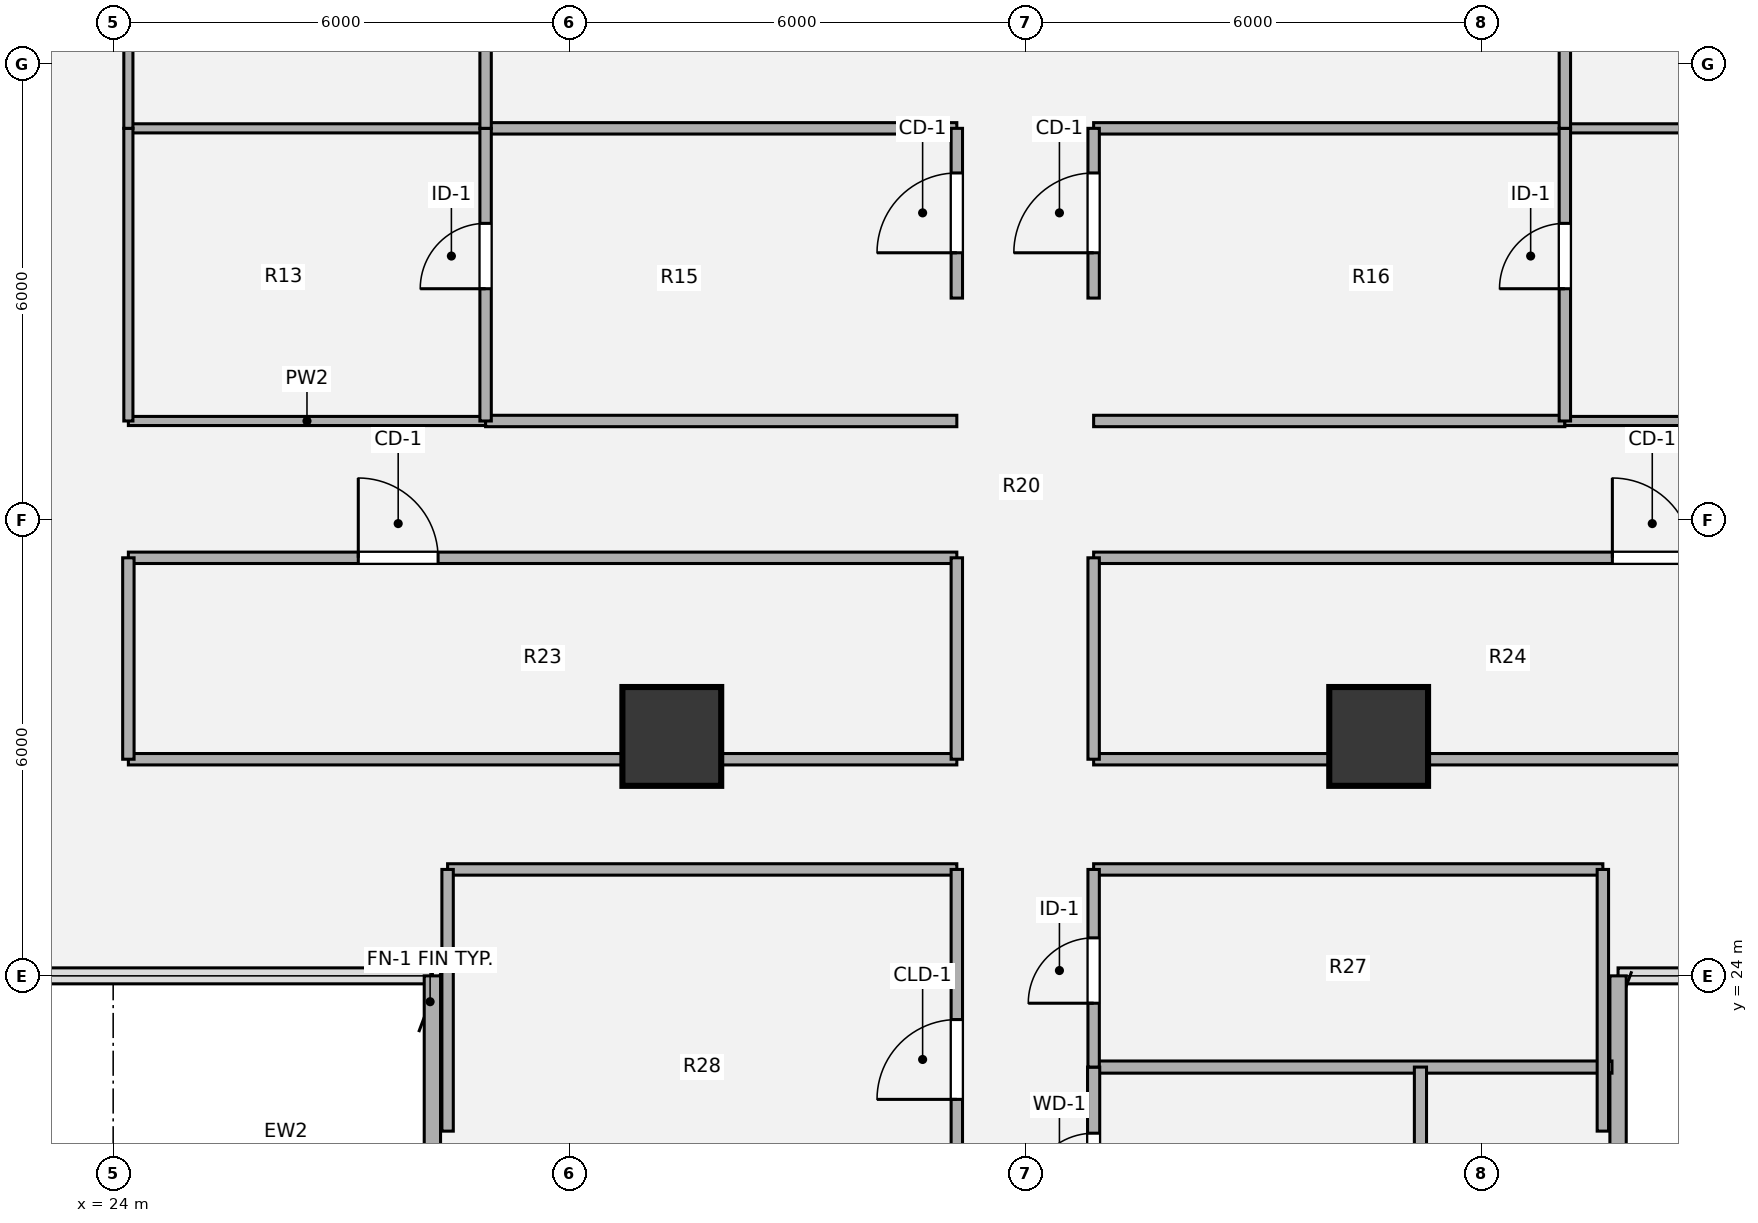
"""IFC4 building model, lengths in metres.
Left out: names, types, materials, properties, quantities, classifications, styles, units other than length and angle.
Written with IfcOpenShell. Run it as: python <this file> out.ifc"""

import sys

from ifc_helpers import new_model, si_unit, direction, frame, frame_2d, origin, origin_2d, place, context, subcontext, project, spatial, rectangle, hollow_circle, extrude, source, transform, mapped, element, fill, save


model = new_model("IFC4")
c1 = context("Model", 3, precision=1e-05, world=origin(), true_north=direction((0.0, 1.0)))
c2 = subcontext(c1, "Body", "Model", "MODEL_VIEW")
j1 = project(units=[si_unit("LENGTHUNIT", "METRE"), si_unit("PLANEANGLEUNIT", "RADIAN")], contexts=[c1])
p1 = place(None, origin())
s1 = spatial("IfcSite", under=j1, at=p1, CompositionType="ELEMENT")
p2 = place(p1, origin())
s2 = spatial("IfcBuilding", under=s1, at=p2, CompositionType="ELEMENT")
p3 = place(p2, frame((0.0, 0.0, 131.4)))
s3 = spatial("IfcBuildingStorey", under=s2, at=p3, CompositionType="ELEMENT", Elevation=131.4)
m1 = source(origin(), c2, "Body", "SweptSolid", [
    extrude(hollow_circle(Radius=0.65, WallThickness=0.045, at=origin_2d()), origin(), (0.0, 0.0, 1.0), 3.78),
])
for number, where, z_axis, x_axis in (
    (1, (31.35, 27.15, 0.0), (0.0, 0.0, 1.0), (1.0, 0.0, 0.0)),
    (2, (40.65, 27.15, 0.0), (0.0, 0.0, 1.0), (1.0, 0.0, 0.0)),
):
    element("IfcColumn", number, at=place(p3, frame(where, z_axis=z_axis, x_axis=x_axis)), inside=s3, PredefinedType="COLUMN", context=c2, shape_type="MappedRepresentation", body=[
        mapped(m1, transform((0.0, 0.0, 0.0), x_axis=(1.0, 0.0, 0.0), y_axis=(0.0, 1.0, 0.0), z_axis=(0.0, 0.0, 1.0), scale=1.0)),
    ])
for number, where, z_axis, x_axis in (
    (3, (28.2, 21.4, 0.0), (0.0, 0.0, 1.0), (0.0, 1.0, 0.0)),
    (4, (43.8, 24.0, 0.0), (0.0, 0.0, 1.0), (0.0, -1.0, 0.0)),
):
    element("IfcWall", number, at=place(p3, frame(where, z_axis=z_axis, x_axis=x_axis)), inside=s3, PredefinedType="SOLIDWALL", context=c2, shape_type="SweptSolid", body=[
        extrude(rectangle(XDim=2.6, YDim=0.215, at=frame_2d((1.3, 0.0))), origin(), (0.0, 0.0, 1.0), 3.53),
    ])
p4 = place(p3, frame((36.9, 22.8, 0.0), z_axis=(0.0, 0.0, 1.0), x_axis=(1.0, 0.0, 0.0)))
e5 = element("IfcWall", 5, at=p4, inside=s3, PredefinedType="PLUMBINGWALL", context=c2, shape_type="SweptSolid", body=[
    extrude(rectangle(XDim=6.82, YDim=0.16, at=frame_2d((3.41, 0.0))), origin(), (0.0, 0.0, 1.0), 3.5),
])
for number, where, z_axis, x_axis in (
    (6, (28.4, 25.4, 0.0), (0.0, 0.0, 1.0), (1.0, 0.0, 0.0)),
    (7, (36.9, 25.4, 0.0), (0.0, 0.0, 1.0), (1.0, 0.0, 0.0)),
):
    element("IfcWall", number, at=place(p3, frame(where, z_axis=z_axis, x_axis=x_axis)), inside=s3, PredefinedType="PARTITIONING", context=c2, shape_type="SweptSolid", body=[
        extrude(rectangle(XDim=6.7, YDim=0.15, at=frame_2d((3.35, 0.0))), origin(), (0.0, 0.0, 1.0), 3.5),
    ])
for number, where, z_axis, x_axis in (
    (8, (24.2, 26.85, 0.0), (0.0, 0.0, 1.0), (1.0, 0.0, 0.0)),
    (9, (36.9, 26.85, 0.0), (0.0, 0.0, 1.0), (1.0, 0.0, 0.0)),
):
    element("IfcWall", number, at=place(p3, frame(where, z_axis=z_axis, x_axis=x_axis)), inside=s3, PredefinedType="PARTITIONING", context=c2, shape_type="SweptSolid", body=[
        extrude(rectangle(XDim=10.9, YDim=0.15, at=frame_2d((5.45, 0.0))), origin(), (0.0, 0.0, 1.0), 2.903),
    ])
p5 = place(p3, frame((24.2, 29.5, 0.0), z_axis=(0.0, 0.0, 1.0), x_axis=(1.0, 0.0, 0.0)))
e10 = element("IfcWall", 10, at=p5, inside=s3, PredefinedType="PARTITIONING", context=c2, shape_type="SweptSolid", body=[
    extrude(rectangle(XDim=10.9, YDim=0.15, at=frame_2d((5.45, 0.0))), origin(), (0.0, 0.0, 1.0), 2.982),
])
p6 = place(p5, frame((3.025, 0.0, 0.0)))
e11 = element("IfcOpeningElement", 11, at=p6, cuts=e10, PredefinedType="OPENING", context=c2, shape_type="SweptSolid", body=[
    extrude(rectangle(XDim=1.05, YDim=2.1, at=origin_2d()), frame((0.525, 0.085, 1.05), z_axis=(0.0, -1.0, 0.0), x_axis=(1.0, 0.0, 0.0)), (0.0, 0.0, 1.0), 0.17),
])
p7 = place(p3, frame((36.9, 29.5, 0.0), z_axis=(0.0, 0.0, 1.0), x_axis=(1.0, 0.0, 0.0)))
e12 = element("IfcWall", 12, at=p7, inside=s3, PredefinedType="PARTITIONING", context=c2, shape_type="SweptSolid", body=[
    extrude(rectangle(XDim=10.9, YDim=0.15, at=frame_2d((5.45, 0.0))), origin(), (0.0, 0.0, 1.0), 2.982),
])
p8 = place(p7, frame((6.825, 0.0, 0.0)))
e13 = element("IfcOpeningElement", 13, at=p8, cuts=e12, PredefinedType="OPENING", context=c2, shape_type="SweptSolid", body=[
    extrude(rectangle(XDim=1.05, YDim=2.1, at=origin_2d()), frame((0.525, 0.085, 1.05), z_axis=(0.0, -1.0, 0.0), x_axis=(1.0, 0.0, 0.0)), (0.0, 0.0, 1.0), 0.17),
])
p9 = place(p3, frame((24.2, 31.3, 0.0), z_axis=(0.0, 0.0, 1.0), x_axis=(1.0, 0.0, 0.0)))
e14 = element("IfcWall", 14, at=p9, inside=s3, PredefinedType="PARTITIONING", context=c2, shape_type="SweptSolid", body=[
    extrude(rectangle(XDim=4.7, YDim=0.12, at=frame_2d((2.35, 0.0))), origin(), (0.0, 0.0, 1.0), 2.982),
])
for number, where, z_axis, x_axis in (
    (15, (28.9, 31.3, 0.0), (0.0, 0.0, 1.0), (1.0, 0.0, 0.0)),
    (16, (36.9, 31.3, 0.0), (0.0, 0.0, 1.0), (1.0, 0.0, 0.0)),
):
    element("IfcWall", number, at=place(p3, frame(where, z_axis=z_axis, x_axis=x_axis)), inside=s3, PredefinedType="PARTITIONING", context=c2, shape_type="SweptSolid", body=[
        extrude(rectangle(XDim=6.2, YDim=0.15, at=frame_2d((3.1, 0.0))), origin(), (0.0, 0.0, 1.0), 2.982),
    ])
for number, where, z_axis, x_axis in (
    (17, (43.1, 31.3, 0.0), (0.0, 0.0, 1.0), (1.0, 0.0, 0.0)),
    (18, (24.2, 35.15, 0.0), (0.0, 0.0, 1.0), (1.0, 0.0, 0.0)),
):
    element("IfcWall", number, at=place(p3, frame(where, z_axis=z_axis, x_axis=x_axis)), inside=s3, PredefinedType="PARTITIONING", context=c2, shape_type="SweptSolid", body=[
        extrude(rectangle(XDim=4.7, YDim=0.12, at=frame_2d((2.35, 0.0))), origin(), (0.0, 0.0, 1.0), 2.982),
    ])
for number, where, z_axis, x_axis in (
    (19, (28.9, 35.15, 0.0), (0.0, 0.0, 1.0), (1.0, 0.0, 0.0)),
    (20, (36.9, 35.15, 0.0), (0.0, 0.0, 1.0), (1.0, 0.0, 0.0)),
):
    element("IfcWall", number, at=place(p3, frame(where, z_axis=z_axis, x_axis=x_axis)), inside=s3, PredefinedType="PARTITIONING", context=c2, shape_type="SweptSolid", body=[
        extrude(rectangle(XDim=6.2, YDim=0.15, at=frame_2d((3.1, 0.0))), origin(), (0.0, 0.0, 1.0), 2.982),
    ])
p10 = place(p3, frame((43.1, 35.15, 0.0), z_axis=(0.0, 0.0, 1.0), x_axis=(1.0, 0.0, 0.0)))
e21 = element("IfcWall", 21, at=p10, inside=s3, PredefinedType="PARTITIONING", context=c2, shape_type="SweptSolid", body=[
    extrude(rectangle(XDim=4.7, YDim=0.12, at=frame_2d((2.35, 0.0))), origin(), (0.0, 0.0, 1.0), 2.982),
])
p11 = place(p3, frame((24.2, 26.85, 0.0), z_axis=(0.0, 0.0, 1.0), x_axis=(0.0, 1.0, 0.0)))
e22 = element("IfcWall", 22, at=p11, inside=s3, PredefinedType="PARTITIONING", context=c2, shape_type="SweptSolid", body=[
    extrude(rectangle(XDim=2.65, YDim=0.15, at=frame_2d((1.325, 0.0))), origin(), (0.0, 0.0, 1.0), 3.5),
])
p12 = place(p3, frame((24.2, 31.3, 0.0), z_axis=(0.0, 0.0, 1.0), x_axis=(0.0, 1.0, 0.0)))
e23 = element("IfcWall", 23, at=p12, inside=s3, PredefinedType="PARTITIONING", context=c2, shape_type="SweptSolid", body=[
    extrude(rectangle(XDim=3.85, YDim=0.12, at=frame_2d((1.925, 0.0))), origin(), (0.0, 0.0, 1.0), 3.5),
])
p13 = place(p3, frame((24.2, 35.15, 0.0), z_axis=(0.0, 0.0, 1.0), x_axis=(0.0, 1.0, 0.0)))
e24 = element("IfcWall", 24, at=p13, inside=s3, PredefinedType="PARTITIONING", context=c2, shape_type="SweptSolid", body=[
    extrude(rectangle(XDim=3.85, YDim=0.12, at=frame_2d((1.925, 0.0))), origin(), (0.0, 0.0, 1.0), 3.5),
])
p14 = place(p3, frame((28.4, 21.957, 0.0), z_axis=(0.0, 0.0, 1.0), x_axis=(0.0, 1.0, 0.0)))
e25 = element("IfcWall", 25, at=p14, inside=s3, PredefinedType="PARTITIONING", context=c2, shape_type="SweptSolid", body=[
    extrude(rectangle(XDim=3.443, YDim=0.15, at=frame_2d((1.721, 0.0))), origin(), (0.0, 0.0, 1.0), 3.5),
])
p15 = place(p3, frame((28.9, 31.3, 0.0), z_axis=(0.0, 0.0, 1.0), x_axis=(0.0, 1.0, 0.0)))
e26 = element("IfcWall", 26, at=p15, inside=s3, PredefinedType="PARTITIONING", context=c2, shape_type="SweptSolid", body=[
    extrude(rectangle(XDim=3.85, YDim=0.15, at=frame_2d((1.925, 0.0))), origin(), (0.0, 0.0, 1.0), 3.5),
])
p16 = place(p15, frame((1.74, 0.0, 0.0)))
e27 = element("IfcOpeningElement", 27, at=p16, cuts=e26, PredefinedType="OPENING", context=c2, shape_type="SweptSolid", body=[
    extrude(rectangle(XDim=0.86, YDim=2.1, at=origin_2d()), frame((0.43, 0.085, 1.05), z_axis=(0.0, -1.0, 0.0), x_axis=(1.0, 0.0, 0.0)), (0.0, 0.0, 1.0), 0.17),
])
p17 = place(p3, frame((28.9, 35.15, 0.0), z_axis=(0.0, 0.0, 1.0), x_axis=(0.0, 1.0, 0.0)))
e28 = element("IfcWall", 28, at=p17, inside=s3, PredefinedType="PARTITIONING", context=c2, shape_type="SweptSolid", body=[
    extrude(rectangle(XDim=3.85, YDim=0.15, at=frame_2d((1.925, 0.0))), origin(), (0.0, 0.0, 1.0), 3.5),
])
p18 = place(p17, frame((1.89, 0.0, 0.0)))
e29 = element("IfcOpeningElement", 29, at=p18, cuts=e28, PredefinedType="OPENING", context=c2, shape_type="SweptSolid", body=[
    extrude(rectangle(XDim=0.86, YDim=2.1, at=origin_2d()), frame((0.43, 0.085, 1.05), z_axis=(0.0, -1.0, 0.0), x_axis=(1.0, 0.0, 0.0)), (0.0, 0.0, 1.0), 0.17),
])
p19 = place(p3, frame((35.1, 20.2, 0.0), z_axis=(0.0, 0.0, 1.0), x_axis=(0.0, 1.0, 0.0)))
e30 = element("IfcWall", 30, at=p19, inside=s3, PredefinedType="PARTITIONING", context=c2, shape_type="SweptSolid", body=[
    extrude(rectangle(XDim=5.2, YDim=0.15, at=frame_2d((2.6, 0.0))), origin(), (0.0, 0.0, 1.0), 3.5),
])
p20 = place(p19, frame((2.175, 0.0, 0.0)))
e31 = element("IfcOpeningElement", 31, at=p20, cuts=e30, PredefinedType="OPENING", context=c2, shape_type="SweptSolid", body=[
    extrude(rectangle(XDim=1.05, YDim=2.1, at=origin_2d()), frame((0.525, 0.085, 1.05), z_axis=(0.0, -1.0, 0.0), x_axis=(1.0, 0.0, 0.0)), (0.0, 0.0, 1.0), 0.17),
])
p21 = place(p3, frame((35.1, 26.85, 0.0), z_axis=(0.0, 0.0, 1.0), x_axis=(0.0, 1.0, 0.0)))
e32 = element("IfcWall", 32, at=p21, inside=s3, PredefinedType="PARTITIONING", context=c2, shape_type="SweptSolid", body=[
    extrude(rectangle(XDim=2.65, YDim=0.15, at=frame_2d((1.325, 0.0))), origin(), (0.0, 0.0, 1.0), 3.5),
])
p22 = place(p3, frame((35.1, 32.917, 0.0), z_axis=(0.0, 0.0, 1.0), x_axis=(0.0, 1.0, 0.0)))
e33 = element("IfcWall", 33, at=p22, inside=s3, PredefinedType="PARTITIONING", context=c2, shape_type="SweptSolid", body=[
    extrude(rectangle(XDim=2.233, YDim=0.15, at=frame_2d((1.116, 0.0))), origin(), (0.0, 0.0, 1.0), 3.5),
])
p23 = place(p22, frame((0.596, 0.0, 0.0)))
e34 = element("IfcOpeningElement", 34, at=p23, cuts=e33, PredefinedType="OPENING", context=c2, shape_type="SweptSolid", body=[
    extrude(rectangle(XDim=1.05, YDim=2.1, at=origin_2d()), frame((0.525, 0.085, 1.05), z_axis=(0.0, -1.0, 0.0), x_axis=(1.0, 0.0, 0.0)), (0.0, 0.0, 1.0), 0.17),
])
p24 = place(p3, frame((36.9, 20.2, 0.0), z_axis=(0.0, 0.0, 1.0), x_axis=(0.0, 1.0, 0.0)))
e35 = element("IfcWall", 35, at=p24, inside=s3, PredefinedType="PLUMBINGWALL", context=c2, shape_type="SweptSolid", body=[
    extrude(rectangle(XDim=2.6, YDim=0.16, at=frame_2d((1.3, 0.0))), origin(), (0.0, 0.0, 1.0), 3.5),
])
p25 = place(p24, frame((0.87, 0.0, 0.0)))
e36 = element("IfcOpeningElement", 36, at=p25, cuts=e35, PredefinedType="OPENING", context=c2, shape_type="SweptSolid", body=[
    extrude(rectangle(XDim=0.86, YDim=2.1, at=origin_2d()), frame((0.43, 0.09, 1.05), z_axis=(0.0, -1.0, 0.0), x_axis=(1.0, 0.0, 0.0)), (0.0, 0.0, 1.0), 0.18),
])
p26 = place(p3, frame((36.9, 22.8, 0.0), z_axis=(0.0, 0.0, 1.0), x_axis=(0.0, 1.0, 0.0)))
e37 = element("IfcWall", 37, at=p26, inside=s3, PredefinedType="PARTITIONING", context=c2, shape_type="SweptSolid", body=[
    extrude(rectangle(XDim=2.6, YDim=0.15, at=frame_2d((1.3, 0.0))), origin(), (0.0, 0.0, 1.0), 3.5),
])
p27 = place(p26, frame((0.84, 0.0, 0.0)))
e38 = element("IfcOpeningElement", 38, at=p27, cuts=e37, PredefinedType="OPENING", context=c2, shape_type="SweptSolid", body=[
    extrude(rectangle(XDim=0.86, YDim=2.1, at=origin_2d()), frame((0.43, 0.085, 1.05), z_axis=(0.0, -1.0, 0.0), x_axis=(1.0, 0.0, 0.0)), (0.0, 0.0, 1.0), 0.17),
])
p28 = place(p3, frame((36.9, 26.85, 0.0), z_axis=(0.0, 0.0, 1.0), x_axis=(0.0, 1.0, 0.0)))
e39 = element("IfcWall", 39, at=p28, inside=s3, PredefinedType="PARTITIONING", context=c2, shape_type="SweptSolid", body=[
    extrude(rectangle(XDim=2.65, YDim=0.15, at=frame_2d((1.325, 0.0))), origin(), (0.0, 0.0, 1.0), 3.5),
])
p29 = place(p3, frame((36.9, 32.917, 0.0), z_axis=(0.0, 0.0, 1.0), x_axis=(0.0, 1.0, 0.0)))
e40 = element("IfcWall", 40, at=p29, inside=s3, PredefinedType="PARTITIONING", context=c2, shape_type="SweptSolid", body=[
    extrude(rectangle(XDim=2.233, YDim=0.15, at=frame_2d((1.116, 0.0))), origin(), (0.0, 0.0, 1.0), 3.5),
])
p30 = place(p29, frame((0.596, 0.0, 0.0)))
e41 = element("IfcOpeningElement", 41, at=p30, cuts=e40, PredefinedType="OPENING", context=c2, shape_type="SweptSolid", body=[
    extrude(rectangle(XDim=1.05, YDim=2.1, at=origin_2d()), frame((0.525, 0.085, 1.05), z_axis=(0.0, -1.0, 0.0), x_axis=(1.0, 0.0, 0.0)), (0.0, 0.0, 1.0), 0.17),
])
p31 = place(p3, frame((41.2, 20.2, 0.0), z_axis=(0.0, 0.0, 1.0), x_axis=(0.0, 1.0, 0.0)))
e42 = element("IfcWall", 42, at=p31, inside=s3, PredefinedType="PLUMBINGWALL", context=c2, shape_type="SweptSolid", body=[
    extrude(rectangle(XDim=2.6, YDim=0.16, at=frame_2d((1.3, 0.0))), origin(), (0.0, 0.0, 1.0), 2.815),
])
p32 = place(p3, frame((43.1, 31.3, 0.0), z_axis=(0.0, 0.0, 1.0), x_axis=(0.0, 1.0, 0.0)))
e43 = element("IfcWall", 43, at=p32, inside=s3, PredefinedType="PARTITIONING", context=c2, shape_type="SweptSolid", body=[
    extrude(rectangle(XDim=3.85, YDim=0.15, at=frame_2d((1.925, 0.0))), origin(), (0.0, 0.0, 1.0), 3.5),
])
p33 = place(p32, frame((1.74, 0.0, 0.0)))
e44 = element("IfcOpeningElement", 44, at=p33, cuts=e43, PredefinedType="OPENING", context=c2, shape_type="SweptSolid", body=[
    extrude(rectangle(XDim=0.86, YDim=2.1, at=origin_2d()), frame((0.43, 0.085, 1.05), z_axis=(0.0, -1.0, 0.0), x_axis=(1.0, 0.0, 0.0)), (0.0, 0.0, 1.0), 0.17),
])
p34 = place(p3, frame((43.1, 35.15, 0.0), z_axis=(0.0, 0.0, 1.0), x_axis=(0.0, 1.0, 0.0)))
e45 = element("IfcWall", 45, at=p34, inside=s3, PredefinedType="PARTITIONING", context=c2, shape_type="SweptSolid", body=[
    extrude(rectangle(XDim=3.85, YDim=0.15, at=frame_2d((1.925, 0.0))), origin(), (0.0, 0.0, 1.0), 3.5),
])
p35 = place(p34, frame((1.89, 0.0, 0.0)))
e46 = element("IfcOpeningElement", 46, at=p35, cuts=e45, PredefinedType="OPENING", context=c2, shape_type="SweptSolid", body=[
    extrude(rectangle(XDim=0.86, YDim=2.1, at=origin_2d()), frame((0.43, 0.085, 1.05), z_axis=(0.0, -1.0, 0.0), x_axis=(1.0, 0.0, 0.0)), (0.0, 0.0, 1.0), 0.17),
])
p36 = place(p3, frame((43.6, 21.958, 0.0), z_axis=(0.0, 0.0, 1.0), x_axis=(0.0, 1.0, 0.0)))
e47 = element("IfcWall", 47, at=p36, inside=s3, PredefinedType="PARTITIONING", context=c2, shape_type="SweptSolid", body=[
    extrude(rectangle(XDim=3.442, YDim=0.15, at=frame_2d((1.721, 0.0))), origin(), (0.0, 0.0, 1.0), 3.5),
])
m2 = source(origin(), c2, "Body", "SweptSolid", [
    extrude(rectangle(XDim=1.05, YDim=2.1, at=origin_2d()), frame((0.525, 0.025, 1.05), z_axis=(0.0, -1.0, 0.0), x_axis=(1.0, 0.0, 0.0)), (0.0, 0.0, 1.0), 0.05),
])
p37 = place(p6, origin())
e48 = element("IfcDoor", 48, at=p37, inside=s3, OperationType="SINGLE_SWING_LEFT", PredefinedType="DOOR", context=c2, shape_type="MappedRepresentation", body=[
    mapped(m2, transform((0.0, 0.0, 0.0), x_axis=(1.0, 0.0, 0.0), y_axis=(0.0, 1.0, 0.0), z_axis=(0.0, 0.0, 1.0), scale=1.0)),
])
fill(e11, e48)
p38 = place(p8, origin())
e49 = element("IfcDoor", 49, at=p38, inside=s3, OperationType="SINGLE_SWING_LEFT", PredefinedType="DOOR", context=c2, shape_type="MappedRepresentation", body=[
    mapped(m2, transform((0.0, 0.0, 0.0), x_axis=(1.0, 0.0, 0.0), y_axis=(0.0, 1.0, 0.0), z_axis=(0.0, 0.0, 1.0), scale=1.0)),
])
fill(e13, e49)
m3 = source(origin(), c2, "Body", "SweptSolid", [
    extrude(rectangle(XDim=0.86, YDim=2.1, at=origin_2d()), frame((0.43, 0.025, 1.05), z_axis=(0.0, -1.0, 0.0), x_axis=(1.0, 0.0, 0.0)), (0.0, 0.0, 1.0), 0.05),
])
p39 = place(p16, origin())
e50 = element("IfcDoor", 50, at=p39, inside=s3, OperationType="SINGLE_SWING_LEFT", PredefinedType="DOOR", context=c2, shape_type="MappedRepresentation", body=[
    mapped(m3, transform((0.0, 0.0, 0.0), x_axis=(1.0, 0.0, 0.0), y_axis=(0.0, 1.0, 0.0), z_axis=(0.0, 0.0, 1.0), scale=1.0)),
])
fill(e27, e50)
m4 = source(origin(), c2, "Body", "SweptSolid", [
    extrude(rectangle(XDim=1.05, YDim=2.1, at=origin_2d()), frame((0.525, 0.025, 1.05), z_axis=(0.0, -1.0, 0.0), x_axis=(1.0, 0.0, 0.0)), (0.0, 0.0, 1.0), 0.05),
])
p40 = place(p20, origin())
e51 = element("IfcDoor", 51, at=p40, inside=s3, OperationType="SINGLE_SWING_LEFT", PredefinedType="DOOR", context=c2, shape_type="MappedRepresentation", body=[
    mapped(m4, transform((0.0, 0.0, 0.0), x_axis=(1.0, 0.0, 0.0), y_axis=(0.0, 1.0, 0.0), z_axis=(0.0, 0.0, 1.0), scale=1.0)),
])
fill(e31, e51)
p41 = place(p23, origin())
e52 = element("IfcDoor", 52, at=p41, inside=s3, OperationType="SINGLE_SWING_LEFT", PredefinedType="DOOR", context=c2, shape_type="MappedRepresentation", body=[
    mapped(m2, transform((0.0, 0.0, 0.0), x_axis=(1.0, 0.0, 0.0), y_axis=(0.0, 1.0, 0.0), z_axis=(0.0, 0.0, 1.0), scale=1.0)),
])
fill(e34, e52)
m5 = source(origin(), c2, "Body", "SweptSolid", [
    extrude(rectangle(XDim=0.86, YDim=2.1, at=origin_2d()), frame((0.43, 0.025, 1.05), z_axis=(0.0, -1.0, 0.0), x_axis=(1.0, 0.0, 0.0)), (0.0, 0.0, 1.0), 0.05),
])
p42 = place(p25, origin())
e53 = element("IfcDoor", 53, at=p42, inside=s3, OperationType="SINGLE_SWING_LEFT", PredefinedType="DOOR", context=c2, shape_type="MappedRepresentation", body=[
    mapped(m5, transform((0.0, 0.0, 0.0), x_axis=(1.0, 0.0, 0.0), y_axis=(0.0, 1.0, 0.0), z_axis=(0.0, 0.0, 1.0), scale=1.0)),
])
fill(e36, e53)
p43 = place(p27, origin())
e54 = element("IfcDoor", 54, at=p43, inside=s3, OperationType="SINGLE_SWING_LEFT", PredefinedType="DOOR", context=c2, shape_type="MappedRepresentation", body=[
    mapped(m3, transform((0.0, 0.0, 0.0), x_axis=(1.0, 0.0, 0.0), y_axis=(0.0, 1.0, 0.0), z_axis=(0.0, 0.0, 1.0), scale=1.0)),
])
fill(e38, e54)
p44 = place(p30, origin())
e55 = element("IfcDoor", 55, at=p44, inside=s3, OperationType="SINGLE_SWING_LEFT", PredefinedType="DOOR", context=c2, shape_type="MappedRepresentation", body=[
    mapped(m2, transform((0.0, 0.0, 0.0), x_axis=(1.0, 0.0, 0.0), y_axis=(0.0, 1.0, 0.0), z_axis=(0.0, 0.0, 1.0), scale=1.0)),
])
fill(e41, e55)
p45 = place(p33, origin())
e56 = element("IfcDoor", 56, at=p45, inside=s3, OperationType="SINGLE_SWING_LEFT", PredefinedType="DOOR", context=c2, shape_type="MappedRepresentation", body=[
    mapped(m3, transform((0.0, 0.0, 0.0), x_axis=(1.0, 0.0, 0.0), y_axis=(0.0, 1.0, 0.0), z_axis=(0.0, 0.0, 1.0), scale=1.0)),
])
fill(e44, e56)
save(model, sys.argv[1])
